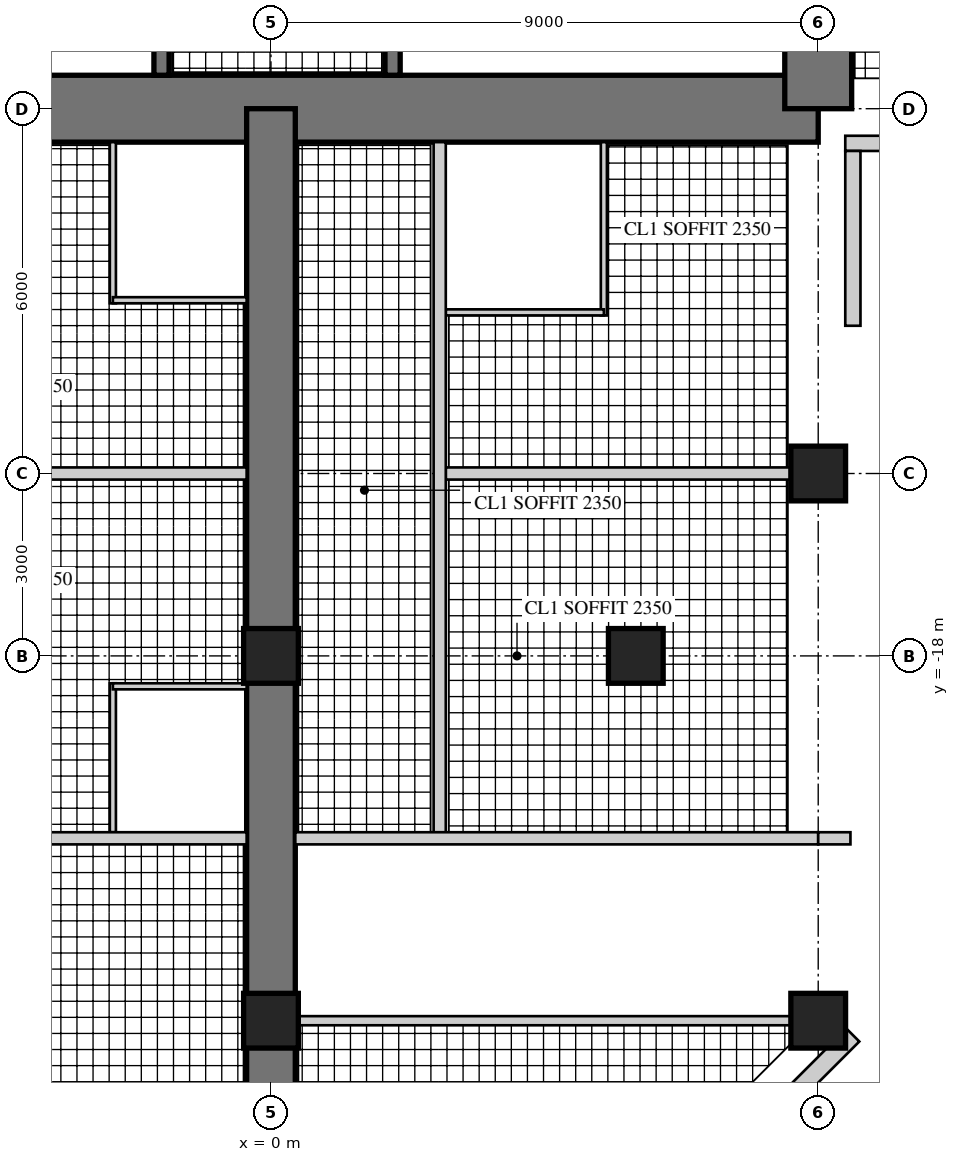
"""IFC4 building model, lengths in metres.
Left out: names, types, materials, properties, quantities, classifications, styles, units other than length and angle.
Written with IfcOpenShell. Run it as: python <this file> out.ifc"""

import sys

from ifc_helpers import new_model, si_unit, direction, frame, frame_2d, origin, origin_2d, place, context, subcontext, project, spatial, rectangle, hollow_rectangle, extrude, element, fill, save


model = new_model("IFC4")
c1 = context("Model", 3, precision=1e-05, world=origin(), true_north=direction((0.0, 1.0)))
c2 = subcontext(c1, "Body", "Model", "MODEL_VIEW")
j1 = project(units=[si_unit("LENGTHUNIT", "METRE"), si_unit("PLANEANGLEUNIT", "RADIAN")], contexts=[c1])
p1 = place(None, origin())
s1 = spatial("IfcSite", under=j1, at=p1, CompositionType="ELEMENT")
p2 = place(p1, origin())
s2 = spatial("IfcBuilding", under=s1, at=p2, CompositionType="ELEMENT")
p3 = place(p2, frame((0.0, 0.0, 189.9)))
s3 = spatial("IfcBuildingStorey", under=s2, at=p3, CompositionType="ELEMENT", Elevation=189.9)
p4 = place(p3, frame((-9.0, -9.0, 0.0), z_axis=(0.0, 0.0, 1.0), x_axis=(1.0, 0.0, 0.0)))
e1 = element("IfcWall", 1, at=p4, inside=s3, PredefinedType="SHEAR", context=c2, shape_type="SweptSolid", body=[
    extrude(rectangle(XDim=18.0, YDim=1.1, at=frame_2d((9.0, 0.0))), origin(), (0.0, 0.0, 1.0), 3.4),
])
p5 = place(p4, frame((9.8, 0.0, 0.0)))
e2 = element("IfcOpeningElement", 2, at=p5, cuts=e1, PredefinedType="OPENING", context=c2, shape_type="SweptSolid", body=[
    extrude(rectangle(XDim=1.0, YDim=2.4, at=frame_2d((0.5, 1.2))), frame((0.0, 0.56, 0.0), z_axis=(0.0, -1.0, 0.0), x_axis=(1.0, 0.0, 0.0)), (0.0, 0.0, 1.0), 1.12),
])
p6 = place(p3, frame((9.0, -9.0, 0.0), z_axis=(0.0, 0.0, 1.0), x_axis=(0.0, 1.0, 0.0)))
e3 = element("IfcWall", 3, at=p6, inside=s3, PredefinedType="SHEAR", context=c2, shape_type="SweptSolid", body=[
    extrude(rectangle(XDim=18.0, YDim=1.1, at=frame_2d((9.0, 0.0))), origin(), (0.0, 0.0, 1.0), 3.4),
])
p7 = place(p6, frame((9.8, 0.0, 0.0)))
e4 = element("IfcOpeningElement", 4, at=p7, cuts=e3, PredefinedType="OPENING", context=c2, shape_type="SweptSolid", body=[
    extrude(rectangle(XDim=1.0, YDim=2.4, at=frame_2d((0.5, 1.2))), frame((0.0, 0.56, 0.0), z_axis=(0.0, -1.0, 0.0), x_axis=(1.0, 0.0, 0.0)), (0.0, 0.0, 1.0), 1.12),
])
p8 = place(p3, frame((-1.8, -1.875, 0.0), z_axis=(0.0, 0.0, 1.0), x_axis=(0.0, -1.0, 0.0)))
e5 = element("IfcWall", 5, at=p8, inside=s3, PredefinedType="SHEAR", context=c2, shape_type="SweptSolid", body=[
    extrude(rectangle(XDim=6.575, YDim=0.25, at=frame_2d((3.288, 0.0))), origin(), (0.0, 0.0, 1.0), 3.4),
])
p9 = place(p8, frame((1.875, 0.0, 0.0)))
e6 = element("IfcOpeningElement", 6, at=p9, cuts=e5, PredefinedType="OPENING", context=c2, shape_type="SweptSolid", body=[
    extrude(rectangle(XDim=1.6, YDim=2.4, at=frame_2d((0.8, 1.2))), frame((0.0, 0.135, 0.0), z_axis=(0.0, -1.0, 0.0), x_axis=(1.0, 0.0, 0.0)), (0.0, 0.0, 1.0), 0.27),
])
p10 = place(p3, frame((2.0, -1.675, 0.0), z_axis=(0.0, 0.0, 1.0), x_axis=(0.0, -1.0, 0.0)))
e7 = element("IfcWall", 7, at=p10, inside=s3, PredefinedType="SHEAR", context=c2, shape_type="SweptSolid", body=[
    extrude(rectangle(XDim=6.775, YDim=0.25, at=frame_2d((3.387, 0.0))), origin(), (0.0, 0.0, 1.0), 3.4),
])
p11 = place(p10, frame((0.725, 0.0, 0.0)))
e8 = element("IfcOpeningElement", 8, at=p11, cuts=e7, PredefinedType="OPENING", context=c2, shape_type="SweptSolid", body=[
    extrude(rectangle(XDim=1.0, YDim=2.1, at=frame_2d((0.5, 1.05))), frame((0.0, 0.135, 0.0), z_axis=(0.0, -1.0, 0.0), x_axis=(1.0, 0.0, 0.0)), (0.0, 0.0, 1.0), 0.27),
])
p12 = place(p3, frame((0.0, -9.0, 0.0), z_axis=(0.0, 0.0, 1.0), x_axis=(0.0, -1.0, 0.0)))
e9 = element("IfcWall", 9, at=p12, inside=s3, PredefinedType="SHEAR", context=c2, shape_type="SweptSolid", body=[
    extrude(rectangle(XDim=18.0, YDim=0.8, at=frame_2d((9.0, 0.0))), origin(), (0.0, 0.0, 1.0), 3.4),
])
p13 = place(p12, frame((3.95, 0.0, 0.0)))
e10 = element("IfcOpeningElement", 10, at=p13, cuts=e9, PredefinedType="OPENING", context=c2, shape_type="SweptSolid", body=[
    extrude(rectangle(XDim=1.0, YDim=2.15, at=frame_2d((0.5, 1.075))), frame((0.0, 0.41, 0.0), z_axis=(0.0, -1.0, 0.0), x_axis=(1.0, 0.0, 0.0)), (0.0, 0.0, 1.0), 0.82),
])
p14 = place(p12, frame((6.6, 0.0, 0.0)))
e11 = element("IfcOpeningElement", 11, at=p14, cuts=e9, PredefinedType="OPENING", context=c2, shape_type="SweptSolid", body=[
    extrude(rectangle(XDim=1.0, YDim=2.15, at=frame_2d((0.5, 1.075))), frame((0.0, 0.41, 0.0), z_axis=(0.0, -1.0, 0.0), x_axis=(1.0, 0.0, 0.0)), (0.0, 0.0, 1.0), 0.82),
])
p15 = place(p12, frame((13.25, 0.0, 0.0)))
e12 = element("IfcOpeningElement", 12, at=p15, cuts=e9, PredefinedType="OPENING", context=c2, shape_type="SweptSolid", body=[
    extrude(rectangle(XDim=1.0, YDim=2.2, at=frame_2d((0.5, 1.1))), frame((0.0, 0.41, 0.0), z_axis=(0.0, -1.0, 0.0), x_axis=(1.0, 0.0, 0.0)), (0.0, 0.0, 1.0), 0.82),
])
for number, where, z_axis, x_axis in (
    (13, (9.0, -15.0, 0.0), (0.0, 0.0, 1.0), (1.0, 0.0, 0.0)),
    (14, (9.0, -24.0, 0.0), (0.0, 0.0, 1.0), (1.0, 0.0, 0.0)),
    (15, (0.0, -18.0, 0.0), (0.0, 0.0, 1.0), (1.0, 0.0, 0.0)),
    (16, (6.0, -18.0, 0.0), (0.0, 0.0, 1.0), (1.0, 0.0, 0.0)),
    (17, (0.0, -24.0, 0.0), (0.0, 0.0, 1.0), (1.0, 0.0, 0.0)),
):
    element("IfcColumn", number, at=place(p3, frame(where, z_axis=z_axis, x_axis=x_axis)), inside=s3, PredefinedType="COLUMN", context=c2, shape_type="SweptSolid", body=[
        extrude(rectangle(XDim=0.9, YDim=0.9, at=origin_2d()), origin(), (0.0, 0.0, 1.0), 3.4),
    ])
p16 = place(p3, frame((9.445, -9.57, 0.0), z_axis=(0.0, 0.0, 1.0), x_axis=(1.0, 0.0, 0.0)))
e18 = element("IfcWall", 18, at=p16, inside=s3, PredefinedType="SOLIDWALL", context=c2, shape_type="SweptSolid", body=[
    extrude(rectangle(XDim=3.125, YDim=0.25, at=frame_2d((1.562, 0.0))), origin(), (0.0, 0.0, 1.0), 3.22),
])
p17 = place(p16, frame((0.6, 0.0, 0.0)))
e19 = element("IfcOpeningElement", 19, at=p17, cuts=e18, PredefinedType="OPENING", context=c2, shape_type="SweptSolid", body=[
    extrude(rectangle(XDim=1.0, YDim=2.2, at=frame_2d((0.5, 1.1))), frame((0.0, 0.135, 0.0), z_axis=(0.0, -1.0, 0.0), x_axis=(1.0, 0.0, 0.0)), (0.0, 0.0, 1.0), 0.27),
])
p18 = place(p3, frame((6.406, -27.4, 0.0), z_axis=(0.0, 0.0, 1.0), x_axis=(0.707134062067, 0.707079499254, 0.0)))
e20 = element("IfcWall", 20, at=p18, inside=s3, PredefinedType="SOLIDWALL", context=c2, shape_type="SweptSolid", body=[
    extrude(rectangle(XDim=4.475, YDim=0.3, at=frame_2d((2.237, 0.0))), origin(), (0.0, 0.0, 1.0), 3.22),
])
p19 = place(p18, frame((1.787, 0.0, 0.3)))
e21 = element("IfcOpeningElement", 21, at=p19, cuts=e20, PredefinedType="OPENING", context=c2, shape_type="SweptSolid", body=[
    extrude(rectangle(XDim=0.9, YDim=2.4, at=frame_2d((0.45, 1.2))), frame((0.0, 0.16, 0.0), z_axis=(0.0, -1.0, 0.0), x_axis=(1.0, 0.0, 0.0)), (0.0, 0.0, 1.0), 0.32),
])
p20 = place(p3, frame((9.57, -12.57, 0.0), z_axis=(0.0, 0.0, 1.0), x_axis=(0.0, 1.0, 0.0)))
e22 = element("IfcWall", 22, at=p20, inside=s3, PredefinedType="SOLIDWALL", context=c2, shape_type="SweptSolid", body=[
    extrude(rectangle(XDim=2.875, YDim=0.25, at=frame_2d((1.438, 0.0))), origin(), (0.0, 0.0, 1.0), 3.22),
])
p21 = place(p20, frame((0.6, 0.0, 0.0)))
e23 = element("IfcOpeningElement", 23, at=p21, cuts=e22, PredefinedType="OPENING", context=c2, shape_type="SweptSolid", body=[
    extrude(rectangle(XDim=1.0, YDim=2.2, at=frame_2d((0.5, 1.1))), frame((0.0, 0.135, 0.0), z_axis=(0.0, -1.0, 0.0), x_axis=(1.0, 0.0, 0.0)), (0.0, 0.0, 1.0), 0.27),
])
p22 = place(p3, frame((5.475, -9.55, 0.0), z_axis=(0.0, 0.0, 1.0), x_axis=(0.0, -1.0, 0.0)))
e24 = element("IfcWall", 24, at=p22, inside=s3, PredefinedType="PARTITIONING", context=c2, shape_type="SweptSolid", body=[
    extrude(rectangle(XDim=2.85, YDim=0.1, at=frame_2d((1.425, 0.0))), origin(), (0.0, 0.0, 1.0), 3.22),
])
p23 = place(p3, frame((2.875, -12.35, 0.0), z_axis=(0.0, 0.0, 1.0), x_axis=(1.0, 0.0, 0.0)))
e25 = element("IfcWall", 25, at=p23, inside=s3, PredefinedType="PARTITIONING", context=c2, shape_type="SweptSolid", body=[
    extrude(rectangle(XDim=2.6, YDim=0.1, at=frame_2d((1.3, 0.0))), origin(), (0.0, 0.0, 1.0), 3.22),
])
p24 = place(p23, frame((0.55, 0.0, 0.0)))
e26 = element("IfcOpeningElement", 26, at=p24, cuts=e25, PredefinedType="OPENING", context=c2, shape_type="SweptSolid", body=[
    extrude(rectangle(XDim=0.9, YDim=2.1, at=frame_2d((0.45, 1.05))), frame((0.0, 0.06, 0.0), z_axis=(0.0, -1.0, 0.0), x_axis=(1.0, 0.0, 0.0)), (0.0, 0.0, 1.0), 0.12),
])
p25 = place(p3, frame((-2.6, -9.55, 0.0), z_axis=(0.0, 0.0, 1.0), x_axis=(0.0, -1.0, 0.0)))
e27 = element("IfcWall", 27, at=p25, inside=s3, PredefinedType="PARTITIONING", context=c2, shape_type="SweptSolid", body=[
    extrude(rectangle(XDim=2.65, YDim=0.1, at=frame_2d((1.325, 0.0))), origin(), (0.0, 0.0, 1.0), 3.22),
])
p26 = place(p3, frame((-2.6, -12.15, 0.0), z_axis=(0.0, 0.0, 1.0), x_axis=(1.0, 0.0, 0.0)))
e28 = element("IfcWall", 28, at=p26, inside=s3, PredefinedType="PARTITIONING", context=c2, shape_type="SweptSolid", body=[
    extrude(rectangle(XDim=2.2, YDim=0.1, at=frame_2d((1.1, 0.0))), origin(), (0.0, 0.0, 1.0), 3.22),
])
p27 = place(p26, frame((0.55, 0.0, 0.0)))
e29 = element("IfcOpeningElement", 29, at=p27, cuts=e28, PredefinedType="OPENING", context=c2, shape_type="SweptSolid", body=[
    extrude(rectangle(XDim=0.9, YDim=2.1, at=frame_2d((0.45, 1.05))), frame((0.0, 0.06, 0.0), z_axis=(0.0, -1.0, 0.0), x_axis=(1.0, 0.0, 0.0)), (0.0, 0.0, 1.0), 0.12),
])
p28 = place(p3, frame((2.875, -15.0, 0.0), z_axis=(0.0, 0.0, 1.0), x_axis=(1.0, 0.0, 0.0)))
e30 = element("IfcWall", 30, at=p28, inside=s3, PredefinedType="SOLIDWALL", context=c2, shape_type="SweptSolid", body=[
    extrude(rectangle(XDim=5.675, YDim=0.2, at=frame_2d((2.837, 0.0))), origin(), (0.0, 0.0, 1.0), 2.47),
])
p29 = place(p3, frame((-8.55, -15.0, 0.0), z_axis=(0.0, 0.0, 1.0), x_axis=(1.0, 0.0, 0.0)))
e31 = element("IfcWall", 31, at=p29, inside=s3, PredefinedType="SOLIDWALL", context=c2, shape_type="SweptSolid", body=[
    extrude(rectangle(XDim=8.15, YDim=0.2, at=frame_2d((4.075, 0.0))), origin(), (0.0, 0.0, 1.0), 2.47),
])
p30 = place(p3, frame((-2.6, -18.45, 0.0), z_axis=(0.0, 0.0, 1.0), x_axis=(0.0, -1.0, 0.0)))
e32 = element("IfcWall", 32, at=p30, inside=s3, PredefinedType="PARTITIONING", context=c2, shape_type="SweptSolid", body=[
    extrude(rectangle(XDim=2.45, YDim=0.1, at=frame_2d((1.225, 0.0))), origin(), (0.0, 0.0, 1.0), 3.22),
])
p31 = place(p3, frame((-2.6, -18.5, 0.0), z_axis=(0.0, 0.0, 1.0), x_axis=(1.0, 0.0, 0.0)))
e33 = element("IfcWall", 33, at=p31, inside=s3, PredefinedType="PARTITIONING", context=c2, shape_type="SweptSolid", body=[
    extrude(rectangle(XDim=2.2, YDim=0.1, at=frame_2d((1.1, 0.0))), origin(), (0.0, 0.0, 1.0), 3.22),
])
p32 = place(p31, frame((0.55, 0.0, 0.0)))
e34 = element("IfcOpeningElement", 34, at=p32, cuts=e33, PredefinedType="OPENING", context=c2, shape_type="SweptSolid", body=[
    extrude(rectangle(XDim=0.9, YDim=2.1, at=frame_2d((0.45, 1.05))), frame((0.0, 0.06, 0.0), z_axis=(0.0, -1.0, 0.0), x_axis=(1.0, 0.0, 0.0)), (0.0, 0.0, 1.0), 0.12),
])
p33 = place(p3, frame((2.775, -9.55, 0.0), z_axis=(0.0, 0.0, 1.0), x_axis=(0.0, -1.0, 0.0)))
e35 = element("IfcWall", 35, at=p33, inside=s3, PredefinedType="SOLIDWALL", context=c2, shape_type="SweptSolid", body=[
    extrude(rectangle(XDim=11.45, YDim=0.2, at=frame_2d((5.725, 0.0))), origin(), (0.0, 0.0, 1.0), 3.22),
])
p34 = place(p33, frame((3.4, 0.0, 0.0)))
e36 = element("IfcOpeningElement", 36, at=p34, cuts=e35, PredefinedType="OPENING", context=c2, shape_type="SweptSolid", body=[
    extrude(rectangle(XDim=1.0, YDim=2.15, at=frame_2d((0.5, 1.075))), frame((0.0, 0.11, 0.0), z_axis=(0.0, -1.0, 0.0), x_axis=(1.0, 0.0, 0.0)), (0.0, 0.0, 1.0), 0.22),
])
p35 = place(p33, frame((6.65, 0.0, 0.0)))
e37 = element("IfcOpeningElement", 37, at=p35, cuts=e35, PredefinedType="OPENING", context=c2, shape_type="SweptSolid", body=[
    extrude(rectangle(XDim=1.0, YDim=2.2, at=frame_2d((0.5, 1.1))), frame((0.0, 0.11, 0.0), z_axis=(0.0, -1.0, 0.0), x_axis=(1.0, 0.0, 0.0)), (0.0, 0.0, 1.0), 0.22),
])
p36 = place(p3, frame((0.4, -24.0, 0.0), z_axis=(0.0, 0.0, 1.0), x_axis=(1.0, 0.0, 0.0)))
e38 = element("IfcWall", 38, at=p36, inside=s3, PredefinedType="PARTITIONING", context=c2, shape_type="SweptSolid", body=[
    extrude(rectangle(XDim=8.15, YDim=0.15, at=frame_2d((4.075, 0.0))), origin(), (0.0, 0.0, 1.0), 2.47),
])
p37 = place(p36, frame((1.2, 0.0, 0.0)))
e39 = element("IfcOpeningElement", 39, at=p37, cuts=e38, PredefinedType="OPENING", context=c2, shape_type="SweptSolid", body=[
    extrude(rectangle(XDim=1.0, YDim=2.2, at=frame_2d((0.5, 1.1))), frame((0.0, 0.085, 0.0), z_axis=(0.0, -1.0, 0.0), x_axis=(1.0, 0.0, 0.0)), (0.0, 0.0, 1.0), 0.17),
])
p38 = place(p3, frame((-9.0, -21.0, 0.0), z_axis=(0.0, 0.0, 1.0), x_axis=(1.0, 0.0, 0.0)))
e40 = element("IfcWall", 40, at=p38, inside=s3, PredefinedType="SOLIDWALL", context=c2, shape_type="SweptSolid", body=[
    extrude(rectangle(XDim=8.6, YDim=0.2, at=frame_2d((4.3, 0.0))), origin(), (0.0, 0.0, 1.0), 2.62),
])
p39 = place(p3, frame((0.4, -21.0, 0.0), z_axis=(0.0, 0.0, 1.0), x_axis=(1.0, 0.0, 0.0)))
e41 = element("IfcWall", 41, at=p39, inside=s3, PredefinedType="SOLIDWALL", context=c2, shape_type="SweptSolid", body=[
    extrude(rectangle(XDim=8.6, YDim=0.2, at=frame_2d((4.3, 0.0))), origin(), (0.0, 0.0, 1.0), 2.62),
])
p40 = place(p39, frame((0.4, 0.0, 0.0)))
e42 = element("IfcOpeningElement", 42, at=p40, cuts=e41, PredefinedType="OPENING", context=c2, shape_type="SweptSolid", body=[
    extrude(rectangle(XDim=1.0, YDim=2.2, at=frame_2d((0.5, 1.1))), frame((0.0, 0.11, 0.0), z_axis=(0.0, -1.0, 0.0), x_axis=(1.0, 0.0, 0.0)), (0.0, 0.0, 1.0), 0.22),
])
p41 = place(p3, frame((9.0, -21.0, 0.0), z_axis=(0.0, 0.0, 1.0), x_axis=(1.0, 0.0, 0.0)))
e43 = element("IfcWall", 43, at=p41, inside=s3, PredefinedType="SOLIDWALL", context=c2, shape_type="SweptSolid", body=[
    extrude(rectangle(XDim=0.53, YDim=0.2, at=frame_2d((0.265, 0.0))), origin(), (0.0, 0.0, 1.0), 3.22),
])
p42 = place(p21, origin())
e44 = element("IfcDoor", 44, at=p42, inside=s3, OperationType="SINGLE_SWING_RIGHT", PredefinedType="DOOR", context=c2, shape_type="SweptSolid", body=[
    extrude(hollow_rectangle(XDim=1.0, YDim=2.2, WallThickness=0.06, at=frame_2d((0.5, 1.1))), frame((0.0, 0.025, 0.0), z_axis=(0.0, -1.0, 0.0), x_axis=(1.0, 0.0, 0.0)), (0.0, 0.0, 1.0), 0.05),
    extrude(rectangle(XDim=0.879, YDim=2.079, at=frame_2d((0.5, 1.1))), frame((0.0, 0.025, 0.0), z_axis=(0.0, -1.0, 0.0), x_axis=(1.0, 0.0, 0.0)), (0.0, 0.0, 1.0), 0.05),
])
fill(e23, e44)
p43 = place(p24, origin())
e45 = element("IfcDoor", 45, at=p43, inside=s3, OperationType="SINGLE_SWING_LEFT", PredefinedType="DOOR", context=c2, shape_type="SweptSolid", body=[
    extrude(rectangle(XDim=0.9, YDim=2.1, at=frame_2d((0.45, 1.05))), frame((0.0, 0.025, 0.0), z_axis=(0.0, -1.0, 0.0), x_axis=(1.0, 0.0, 0.0)), (0.0, 0.0, 1.0), 0.05),
])
fill(e26, e45)
p44 = place(p27, origin())
e46 = element("IfcDoor", 46, at=p44, inside=s3, OperationType="SINGLE_SWING_LEFT", PredefinedType="DOOR", context=c2, shape_type="SweptSolid", body=[
    extrude(rectangle(XDim=0.9, YDim=2.1, at=frame_2d((0.45, 1.05))), frame((0.0, 0.025, 0.0), z_axis=(0.0, -1.0, 0.0), x_axis=(1.0, 0.0, 0.0)), (0.0, 0.0, 1.0), 0.05),
])
fill(e29, e46)
p45 = place(p32, frame((0.9, 0.0, 0.0), z_axis=(0.0, 0.0, 1.0), x_axis=(-1.0, 0.0, 0.0)))
e47 = element("IfcDoor", 47, at=p45, inside=s3, OperationType="SINGLE_SWING_RIGHT", PredefinedType="DOOR", context=c2, shape_type="SweptSolid", body=[
    extrude(rectangle(XDim=0.9, YDim=2.1, at=frame_2d((0.45, 1.05))), frame((0.0, 0.025, 0.0), z_axis=(0.0, -1.0, 0.0), x_axis=(1.0, 0.0, 0.0)), (0.0, 0.0, 1.0), 0.05),
])
fill(e34, e47)
p46 = place(p34, origin())
e48 = element("IfcDoor", 48, at=p46, inside=s3, OperationType="SINGLE_SWING_LEFT", PredefinedType="DOOR", context=c2, shape_type="SweptSolid", body=[
    extrude(rectangle(XDim=1.0, YDim=2.15, at=frame_2d((0.5, 1.075))), frame((0.0, 0.025, 0.0), z_axis=(0.0, -1.0, 0.0), x_axis=(1.0, 0.0, 0.0)), (0.0, 0.0, 1.0), 0.05),
])
fill(e36, e48)
p47 = place(p35, origin())
e49 = element("IfcDoor", 49, at=p47, inside=s3, OperationType="SINGLE_SWING_LEFT", PredefinedType="DOOR", context=c2, shape_type="SweptSolid", body=[
    extrude(rectangle(XDim=1.0, YDim=2.2, at=frame_2d((0.5, 1.1))), frame((0.0, 0.025, 0.0), z_axis=(0.0, -1.0, 0.0), x_axis=(1.0, 0.0, 0.0)), (0.0, 0.0, 1.0), 0.05),
])
fill(e37, e49)
p48 = place(p37, frame((1.0, 0.0, 0.0), z_axis=(0.0, 0.0, 1.0), x_axis=(-1.0, 0.0, 0.0)))
e50 = element("IfcDoor", 50, at=p48, inside=s3, OperationType="SINGLE_SWING_RIGHT", PredefinedType="DOOR", context=c2, shape_type="SweptSolid", body=[
    extrude(rectangle(XDim=1.0, YDim=2.2, at=frame_2d((0.5, 1.1))), frame((0.0, 0.025, 0.0), z_axis=(0.0, -1.0, 0.0), x_axis=(1.0, 0.0, 0.0)), (0.0, 0.0, 1.0), 0.05),
])
fill(e39, e50)
p49 = place(p40, frame((1.0, 0.0, 0.0), z_axis=(0.0, 0.0, 1.0), x_axis=(-1.0, 0.0, 0.0)))
e51 = element("IfcDoor", 51, at=p49, inside=s3, OperationType="SINGLE_SWING_RIGHT", PredefinedType="DOOR", context=c2, shape_type="SweptSolid", body=[
    extrude(rectangle(XDim=1.0, YDim=2.2, at=frame_2d((0.5, 1.1))), frame((0.0, 0.025, 0.0), z_axis=(0.0, -1.0, 0.0), x_axis=(1.0, 0.0, 0.0)), (0.0, 0.0, 1.0), 0.05),
])
fill(e42, e51)
p50 = place(p13, frame((1.0, 0.0, 0.0), z_axis=(0.0, 0.0, 1.0), x_axis=(-1.0, 0.0, 0.0)))
e52 = element("IfcDoor", 52, at=p50, inside=s3, OperationType="SINGLE_SWING_RIGHT", PredefinedType="DOOR", context=c2, shape_type="SweptSolid", body=[
    extrude(rectangle(XDim=1.0, YDim=2.15, at=frame_2d((0.5, 1.075))), frame((0.0, 0.025, 0.0), z_axis=(0.0, -1.0, 0.0), x_axis=(1.0, 0.0, 0.0)), (0.0, 0.0, 1.0), 0.05),
])
fill(e10, e52)
p51 = place(p14, frame((1.0, 0.0, 0.0), z_axis=(0.0, 0.0, 1.0), x_axis=(-1.0, 0.0, 0.0)))
e53 = element("IfcDoor", 53, at=p51, inside=s3, OperationType="SINGLE_SWING_RIGHT", PredefinedType="DOOR", context=c2, shape_type="SweptSolid", body=[
    extrude(rectangle(XDim=1.0, YDim=2.15, at=frame_2d((0.5, 1.075))), frame((0.0, 0.025, 0.0), z_axis=(0.0, -1.0, 0.0), x_axis=(1.0, 0.0, 0.0)), (0.0, 0.0, 1.0), 0.05),
])
fill(e11, e53)
p52 = place(p15, origin())
e54 = element("IfcDoor", 54, at=p52, inside=s3, OperationType="SINGLE_SWING_RIGHT", PredefinedType="DOOR", context=c2, shape_type="SweptSolid", body=[
    extrude(rectangle(XDim=1.0, YDim=2.2, at=frame_2d((0.5, 1.1))), frame((0.0, 0.025, 0.0), z_axis=(0.0, -1.0, 0.0), x_axis=(1.0, 0.0, 0.0)), (0.0, 0.0, 1.0), 0.05),
])
fill(e12, e54)
p53 = place(p5, origin())
e55 = element("IfcDoor", 55, at=p53, inside=s3, OperationType="SINGLE_SWING_RIGHT", PredefinedType="DOOR", context=c2, shape_type="SweptSolid", body=[
    extrude(rectangle(XDim=1.0, YDim=2.4, at=frame_2d((0.5, 1.2))), frame((0.0, 0.055, 0.0), z_axis=(0.0, -1.0, 0.0), x_axis=(1.0, 0.0, 0.0)), (0.0, 0.0, 1.0), 0.05),
])
fill(e2, e55)
save(model, sys.argv[1])
